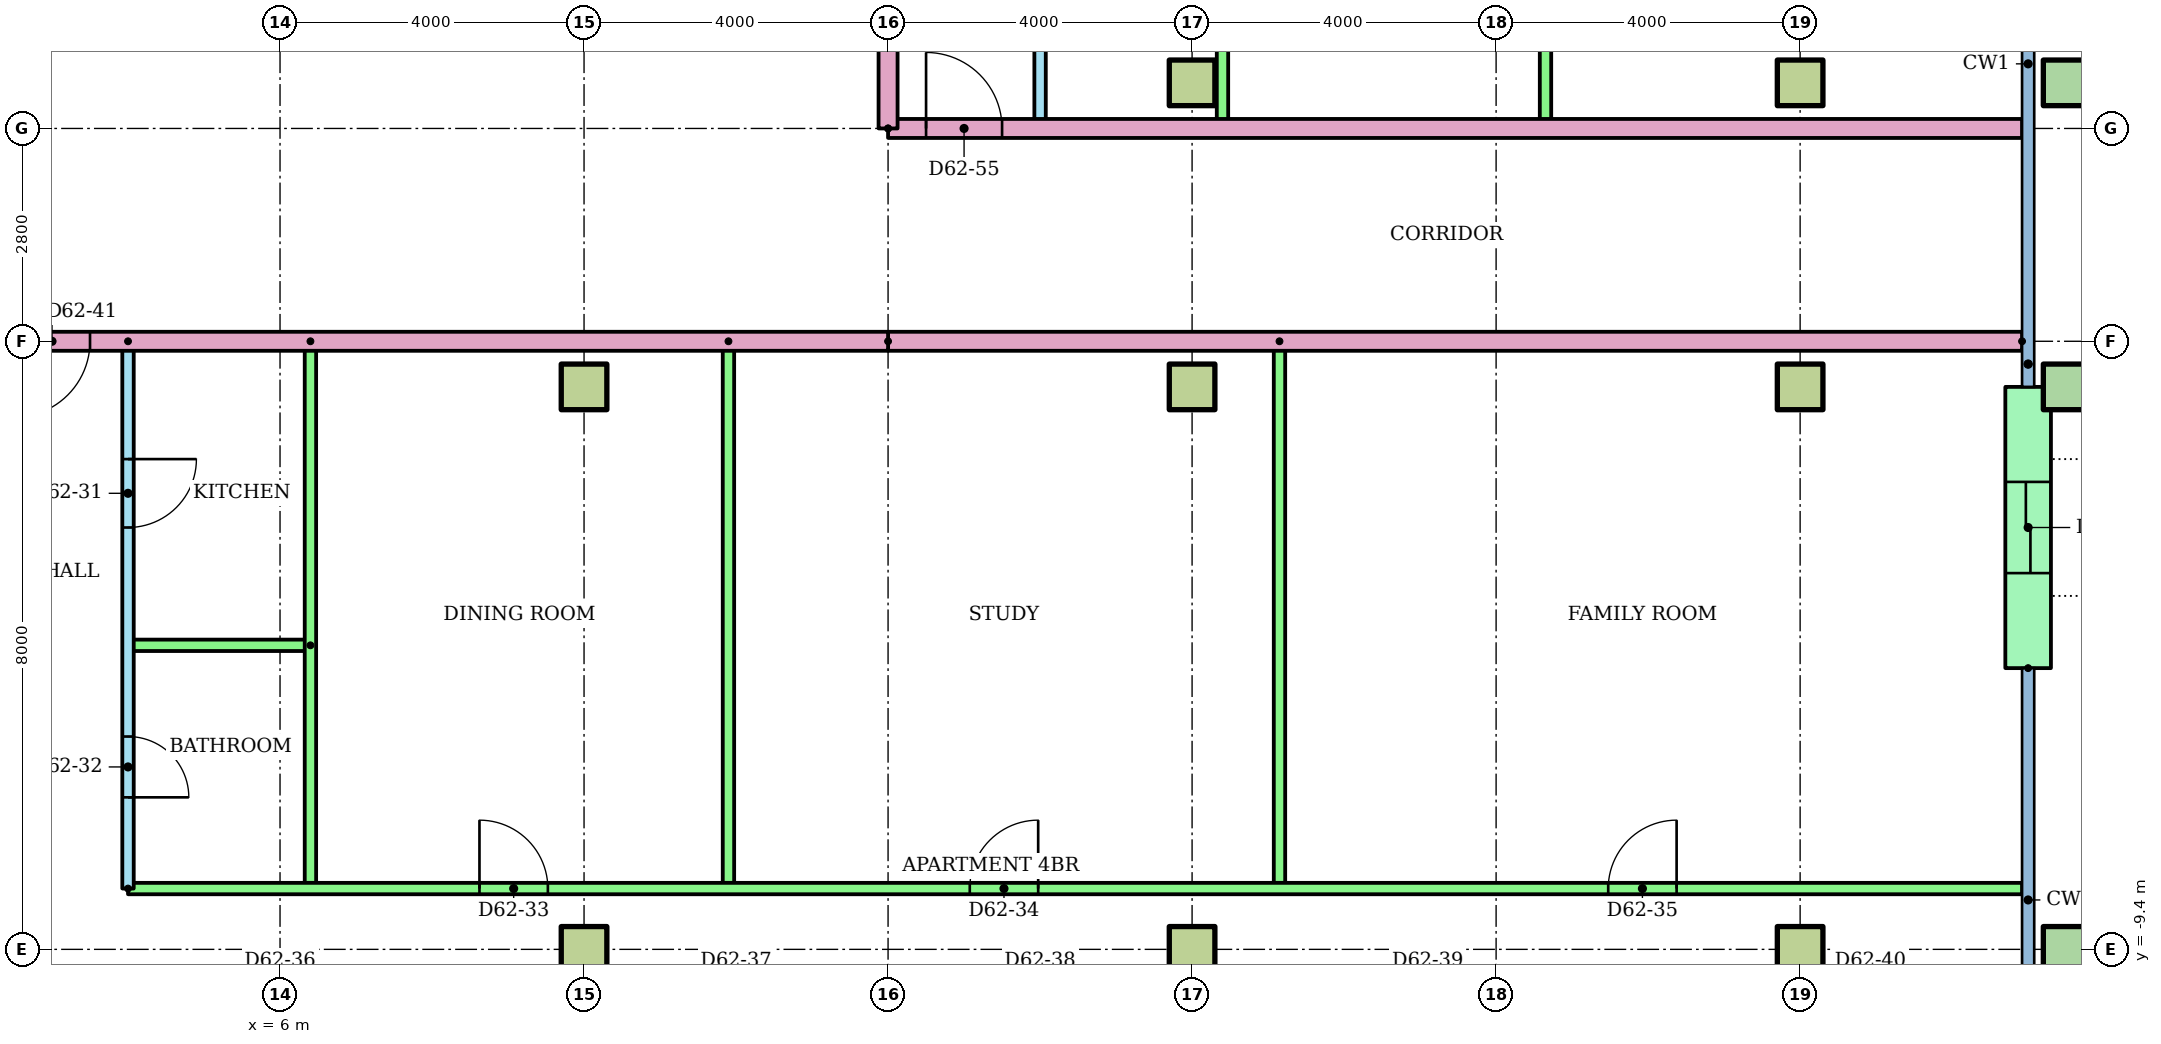
"""IFC4 building model, lengths in metres.
Left out: names, types, materials, properties, quantities, classifications, styles, units other than length and angle.
Written with IfcOpenShell. Run it as: python <this file> out.ifc"""

import sys

from ifc_helpers import new_model, si_unit, direction, frame, frame_2d, origin, origin_2d, place, context, subcontext, project, spatial, rectangle, hollow_rectangle, extrude, element, fill, save


model = new_model("IFC4")
c1 = context("Model", 3, precision=1e-05, world=origin(), true_north=direction((0.0, 1.0)))
c2 = subcontext(c1, "Body", "Model", "MODEL_VIEW")
j1 = project(units=[si_unit("LENGTHUNIT", "METRE"), si_unit("PLANEANGLEUNIT", "RADIAN")], contexts=[c1])
p1 = place(None, origin())
s1 = spatial("IfcSite", under=j1, at=p1, CompositionType="ELEMENT")
p2 = place(p1, origin())
s2 = spatial("IfcBuilding", under=s1, at=p2, CompositionType="ELEMENT")
p3 = place(p2, frame((0.0, 0.0, 236.4)))
s3 = spatial("IfcBuildingStorey", under=s2, at=p3, CompositionType="ELEMENT", Elevation=236.4)
for number, where in (
    (1, (10.0, -9.4, 0.0)),
    (2, (18.0, -9.4, 0.0)),
    (3, (26.0, -9.4, 0.0)),
):
    element("IfcColumn", number, at=place(p3, frame(where)), inside=s3, PredefinedType="COLUMN", context=c2, shape_type="SweptSolid", body=[
        extrude(rectangle(XDim=0.6, YDim=0.6, at=origin_2d()), origin(), (0.0, 0.0, 1.0), 3.2),
    ])
p4 = place(p3, frame((29.5, -9.4, 0.0)))
e4 = element("IfcColumn", 4, at=p4, inside=s3, PredefinedType="COLUMN", context=c2, shape_type="SweptSolid", body=[
    extrude(hollow_rectangle(XDim=0.6, YDim=0.6, WallThickness=0.03, at=origin_2d()), origin(), (0.0, 0.0, 1.0), 3.2),
])
for number, where in (
    (5, (10.0, -2.0, 0.0)),
    (6, (18.0, -2.0, 0.0)),
    (7, (26.0, -2.0, 0.0)),
):
    element("IfcColumn", number, at=place(p3, frame(where)), inside=s3, PredefinedType="COLUMN", context=c2, shape_type="SweptSolid", body=[
        extrude(rectangle(XDim=0.6, YDim=0.6, at=origin_2d()), origin(), (0.0, 0.0, 1.0), 3.2),
    ])
p5 = place(p3, frame((29.5, -2.0, 0.0)))
e8 = element("IfcColumn", 8, at=p5, inside=s3, PredefinedType="COLUMN", context=c2, shape_type="SweptSolid", body=[
    extrude(hollow_rectangle(XDim=0.6, YDim=0.6, WallThickness=0.03, at=origin_2d()), origin(), (0.0, 0.0, 1.0), 3.2),
])
for number, where in (
    (9, (18.0, 2.0, 0.0)),
    (10, (26.0, 2.0, 0.0)),
):
    element("IfcColumn", number, at=place(p3, frame(where)), inside=s3, PredefinedType="COLUMN", context=c2, shape_type="SweptSolid", body=[
        extrude(rectangle(XDim=0.6, YDim=0.6, at=origin_2d()), origin(), (0.0, 0.0, 1.0), 3.2),
    ])
p6 = place(p3, frame((29.5, 2.0, 0.0)))
e11 = element("IfcColumn", 11, at=p6, inside=s3, PredefinedType="COLUMN", context=c2, shape_type="SweptSolid", body=[
    extrude(hollow_rectangle(XDim=0.6, YDim=0.6, WallThickness=0.03, at=origin_2d()), origin(), (0.0, 0.0, 1.0), 3.2),
])
p7 = place(p3, frame((29.0, -5.7, 0.0), z_axis=(0.0, 0.0, 1.0), x_axis=(0.0, 1.0, 0.0)))
e12 = element("IfcWall", 12, at=p7, inside=s3, PredefinedType="STANDARD", context=c2, shape_type="SweptSolid", body=[
    extrude(rectangle(XDim=3.7, YDim=0.6, at=frame_2d((1.85, 0.0))), origin(), (0.0, 0.0, 1.0), 2.8),
])
p8 = place(p7, frame((1.25, 0.0, 0.0)))
e13 = element("IfcOpeningElement", 13, at=p8, cuts=e12, PredefinedType="OPENING", context=c2, shape_type="SweptSolid", body=[
    extrude(rectangle(XDim=1.2, YDim=2.1, at=frame_2d((0.6, 1.05))), frame((0.0, 0.31, 0.0), z_axis=(0.0, -1.0, 0.0), x_axis=(1.0, 0.0, 0.0)), (0.0, 0.0, 1.0), 0.62),
])
p9 = place(p3, frame((4.0, -1.4, 0.0), z_axis=(0.0, 0.0, 1.0), x_axis=(0.0, -1.0, 0.0)))
e14 = element("IfcWall", 14, at=p9, inside=s3, PredefinedType="PARTITIONING", context=c2, shape_type="SweptSolid", body=[
    extrude(rectangle(XDim=7.2, YDim=0.15, at=frame_2d((3.6, 0.0))), origin(), (0.0, 0.0, 1.0), 2.4),
])
p10 = place(p9, frame((1.55, 0.0, 0.0)))
e15 = element("IfcOpeningElement", 15, at=p10, cuts=e14, PredefinedType="OPENING", context=c2, shape_type="SweptSolid", body=[
    extrude(rectangle(XDim=0.9, YDim=2.1, at=frame_2d((0.45, 1.05))), frame((0.0, 0.085, 0.0), z_axis=(0.0, -1.0, 0.0), x_axis=(1.0, 0.0, 0.0)), (0.0, 0.0, 1.0), 0.17),
])
p11 = place(p9, frame((5.2, 0.0, 0.0)))
e16 = element("IfcOpeningElement", 16, at=p11, cuts=e14, PredefinedType="OPENING", context=c2, shape_type="SweptSolid", body=[
    extrude(rectangle(XDim=0.8, YDim=2.1, at=frame_2d((0.4, 1.05))), frame((0.0, 0.085, 0.0), z_axis=(0.0, -1.0, 0.0), x_axis=(1.0, 0.0, 0.0)), (0.0, 0.0, 1.0), 0.17),
])
p12 = place(p3, frame((6.4, -5.4, 0.0), z_axis=(0.0, 0.0, 1.0), x_axis=(-1.0, 0.0, 0.0)))
e17 = element("IfcWall", 17, at=p12, inside=s3, PredefinedType="PARTITIONING", context=c2, shape_type="SweptSolid", body=[
    extrude(rectangle(XDim=2.4, YDim=0.15, at=frame_2d((1.2, 0.0))), origin(), (0.0, 0.0, 1.0), 2.4),
])
for number, where, z_axis, x_axis in (
    (18, (6.4, -1.4, 0.0), (0.0, 0.0, 1.0), (0.0, -1.0, 0.0)),
    (19, (11.9, -1.4, 0.0), (0.0, 0.0, 1.0), (0.0, -1.0, 0.0)),
    (20, (19.15, -1.4, 0.0), (0.0, 0.0, 1.0), (0.0, -1.0, 0.0)),
):
    element("IfcWall", number, at=place(p3, frame(where, z_axis=z_axis, x_axis=x_axis)), inside=s3, PredefinedType="PARTITIONING", context=c2, shape_type="SweptSolid", body=[
        extrude(rectangle(XDim=7.2, YDim=0.15, at=frame_2d((3.6, 0.0))), origin(), (0.0, 0.0, 1.0), 2.4),
    ])
p13 = place(p3, frame((4.0, -8.6, 0.0)))
e21 = element("IfcWall", 21, at=p13, inside=s3, PredefinedType="PARTITIONING", context=c2, shape_type="SweptSolid", body=[
    extrude(rectangle(XDim=24.92, YDim=0.15, at=frame_2d((12.46, 0.0))), origin(), (0.0, 0.0, 1.0), 2.4),
])
p14 = place(p13, frame((4.624, 0.0, 0.0)))
e22 = element("IfcOpeningElement", 22, at=p14, cuts=e21, PredefinedType="OPENING", context=c2, shape_type="SweptSolid", body=[
    extrude(rectangle(XDim=0.9, YDim=2.1, at=frame_2d((0.45, 1.05))), frame((0.0, 0.085, 0.0), z_axis=(0.0, -1.0, 0.0), x_axis=(1.0, 0.0, 0.0)), (0.0, 0.0, 1.0), 0.17),
])
p15 = place(p13, frame((11.075, 0.0, 0.0)))
e23 = element("IfcOpeningElement", 23, at=p15, cuts=e21, PredefinedType="OPENING", context=c2, shape_type="SweptSolid", body=[
    extrude(rectangle(XDim=0.9, YDim=2.1, at=frame_2d((0.45, 1.05))), frame((0.0, 0.085, 0.0), z_axis=(0.0, -1.0, 0.0), x_axis=(1.0, 0.0, 0.0)), (0.0, 0.0, 1.0), 0.17),
])
p16 = place(p13, frame((19.475, 0.0, 0.0)))
e24 = element("IfcOpeningElement", 24, at=p16, cuts=e21, PredefinedType="OPENING", context=c2, shape_type="SweptSolid", body=[
    extrude(rectangle(XDim=0.9, YDim=2.1, at=frame_2d((0.45, 1.05))), frame((0.0, 0.085, 0.0), z_axis=(0.0, -1.0, 0.0), x_axis=(1.0, 0.0, 0.0)), (0.0, 0.0, 1.0), 0.17),
])
p17 = place(p3, frame((28.92, -1.4, 0.0), z_axis=(0.0, 0.0, 1.0), x_axis=(-1.0, 0.0, 0.0)))
e25 = element("IfcWall", 25, at=p17, inside=s3, PredefinedType="PARTITIONING", context=c2, shape_type="SweptSolid", body=[
    extrude(rectangle(XDim=14.92, YDim=0.25, at=frame_2d((7.46, 0.0))), origin(), (0.0, 0.0, 1.0), 2.4),
])
p18 = place(p3, frame((16.0, 11.0, 0.0), z_axis=(0.0, 0.0, 1.0), x_axis=(0.0, -1.0, 0.0)))
e26 = element("IfcWall", 26, at=p18, inside=s3, PredefinedType="PARTITIONING", context=c2, shape_type="SweptSolid", body=[
    extrude(rectangle(XDim=9.6, YDim=0.15, at=frame_2d((4.8, 0.0))), origin(), (0.0, 0.0, 1.0), 2.4),
])
p19 = place(p18, frame((6.525, 0.0, 0.0)))
e27 = element("IfcOpeningElement", 27, at=p19, cuts=e26, PredefinedType="OPENING", context=c2, shape_type="SweptSolid", body=[
    extrude(rectangle(XDim=0.9, YDim=2.1, at=frame_2d((0.45, 1.05))), frame((0.0, 0.085, 0.0), z_axis=(0.0, -1.0, 0.0), x_axis=(1.0, 0.0, 0.0)), (0.0, 0.0, 1.0), 0.17),
])
p20 = place(p18, frame((1.775, 0.0, 0.0)))
e28 = element("IfcOpeningElement", 28, at=p20, cuts=e26, PredefinedType="OPENING", context=c2, shape_type="SweptSolid", body=[
    extrude(rectangle(XDim=0.8, YDim=2.1, at=frame_2d((0.4, 1.05))), frame((0.0, 0.085, 0.0), z_axis=(0.0, -1.0, 0.0), x_axis=(1.0, 0.0, 0.0)), (0.0, 0.0, 1.0), 0.17),
])
for number, where, z_axis, x_axis in (
    (29, (18.4, 11.0, 0.0), (0.0, 0.0, 1.0), (0.0, -1.0, 0.0)),
    (30, (22.65, 11.0, 0.0), (0.0, 0.0, 1.0), (0.0, -1.0, 0.0)),
):
    element("IfcWall", number, at=place(p3, frame(where, z_axis=z_axis, x_axis=x_axis)), inside=s3, PredefinedType="PARTITIONING", context=c2, shape_type="SweptSolid", body=[
        extrude(rectangle(XDim=9.6, YDim=0.15, at=frame_2d((4.8, 0.0))), origin(), (0.0, 0.0, 1.0), 2.4),
    ])
p21 = place(p3, frame((14.0, 1.4, 0.0)))
e31 = element("IfcWall", 31, at=p21, inside=s3, PredefinedType="PARTITIONING", context=c2, shape_type="SweptSolid", body=[
    extrude(rectangle(XDim=14.92, YDim=0.25, at=frame_2d((7.46, 0.0))), origin(), (0.0, 0.0, 1.0), 2.4),
])
p22 = place(p21, frame((0.5, 0.0, 0.0)))
e32 = element("IfcOpeningElement", 32, at=p22, cuts=e31, PredefinedType="OPENING", context=c2, shape_type="SweptSolid", body=[
    extrude(rectangle(XDim=1.0, YDim=2.1, at=frame_2d((0.5, 1.05))), frame((0.0, 0.135, 0.0), z_axis=(0.0, -1.0, 0.0), x_axis=(1.0, 0.0, 0.0)), (0.0, 0.0, 1.0), 0.27),
])
p23 = place(p3, frame((14.0, -1.4, 0.0), z_axis=(0.0, 0.0, 1.0), x_axis=(-1.0, 0.0, 0.0)))
e33 = element("IfcWall", 33, at=p23, inside=s3, PredefinedType="PARTITIONING", context=c2, shape_type="SweptSolid", body=[
    extrude(rectangle(XDim=28.0, YDim=0.25, at=frame_2d((14.0, 0.0))), origin(), (0.0, 0.0, 1.0), 2.4),
])
p24 = place(p23, frame((12.5, 0.0, 0.0)))
e34 = element("IfcOpeningElement", 34, at=p24, cuts=e33, PredefinedType="OPENING", context=c2, shape_type="SweptSolid", body=[
    extrude(rectangle(XDim=1.0, YDim=2.1, at=frame_2d((0.5, 1.05))), frame((0.0, 0.135, 0.0), z_axis=(0.0, -1.0, 0.0), x_axis=(1.0, 0.0, 0.0)), (0.0, 0.0, 1.0), 0.27),
])
p25 = place(p23, frame((10.5, 0.0, 0.0)))
e35 = element("IfcOpeningElement", 35, at=p25, cuts=e33, PredefinedType="OPENING", context=c2, shape_type="SweptSolid", body=[
    extrude(rectangle(XDim=1.0, YDim=2.1, at=frame_2d((0.5, 1.05))), frame((0.0, 0.135, 0.0), z_axis=(0.0, -1.0, 0.0), x_axis=(1.0, 0.0, 0.0)), (0.0, 0.0, 1.0), 0.27),
])
p26 = place(p3, frame((14.0, 1.4, 0.0), z_axis=(0.0, 0.0, 1.0), x_axis=(0.0, 1.0, 0.0)))
e36 = element("IfcWall", 36, at=p26, inside=s3, PredefinedType="PARTITIONING", context=c2, shape_type="SweptSolid", body=[
    extrude(rectangle(XDim=1.6, YDim=0.25, at=frame_2d((0.8, 0.0))), origin(), (0.0, 0.0, 1.0), 2.4),
])
p27 = place(p10, origin())
e37 = element("IfcDoor", 37, at=p27, inside=s3, OperationType="SINGLE_SWING_LEFT", PredefinedType="DOOR", context=c2, shape_type="SweptSolid", body=[
    extrude(rectangle(XDim=0.9, YDim=2.1, at=frame_2d((0.45, 1.05))), frame((0.0, 0.025, 0.0), z_axis=(0.0, -1.0, 0.0), x_axis=(1.0, 0.0, 0.0)), (0.0, 0.0, 1.0), 0.05),
])
fill(e15, e37)
p28 = place(p11, origin())
e38 = element("IfcDoor", 38, at=p28, inside=s3, OperationType="SINGLE_SWING_RIGHT", PredefinedType="DOOR", context=c2, shape_type="SweptSolid", body=[
    extrude(rectangle(XDim=0.8, YDim=2.1, at=frame_2d((0.4, 1.05))), frame((0.0, 0.025, 0.0), z_axis=(0.0, -1.0, 0.0), x_axis=(1.0, 0.0, 0.0)), (0.0, 0.0, 1.0), 0.05),
])
fill(e16, e38)
p29 = place(p14, origin())
e39 = element("IfcDoor", 39, at=p29, inside=s3, OperationType="SINGLE_SWING_LEFT", PredefinedType="DOOR", context=c2, shape_type="SweptSolid", body=[
    extrude(rectangle(XDim=0.9, YDim=2.1, at=frame_2d((0.45, 1.05))), frame((0.0, 0.025, 0.0), z_axis=(0.0, -1.0, 0.0), x_axis=(1.0, 0.0, 0.0)), (0.0, 0.0, 1.0), 0.05),
])
fill(e22, e39)
p30 = place(p15, origin())
e40 = element("IfcDoor", 40, at=p30, inside=s3, OperationType="SINGLE_SWING_RIGHT", PredefinedType="DOOR", context=c2, shape_type="SweptSolid", body=[
    extrude(rectangle(XDim=0.9, YDim=2.1, at=frame_2d((0.45, 1.05))), frame((0.0, 0.025, 0.0), z_axis=(0.0, -1.0, 0.0), x_axis=(1.0, 0.0, 0.0)), (0.0, 0.0, 1.0), 0.05),
])
fill(e23, e40)
p31 = place(p16, origin())
e41 = element("IfcDoor", 41, at=p31, inside=s3, OperationType="SINGLE_SWING_RIGHT", PredefinedType="DOOR", context=c2, shape_type="SweptSolid", body=[
    extrude(rectangle(XDim=0.9, YDim=2.1, at=frame_2d((0.45, 1.05))), frame((0.0, 0.025, 0.0), z_axis=(0.0, -1.0, 0.0), x_axis=(1.0, 0.0, 0.0)), (0.0, 0.0, 1.0), 0.05),
])
fill(e24, e41)
p32 = place(p25, origin())
e42 = element("IfcDoor", 42, at=p32, inside=s3, OperationType="SINGLE_SWING_RIGHT", PredefinedType="DOOR", context=c2, shape_type="SweptSolid", body=[
    extrude(rectangle(XDim=1.0, YDim=2.1, at=frame_2d((0.5, 1.05))), frame((0.0, 0.025, 0.0), z_axis=(0.0, -1.0, 0.0), x_axis=(1.0, 0.0, 0.0)), (0.0, 0.0, 1.0), 0.05),
])
fill(e35, e42)
p33 = place(p22, origin())
e43 = element("IfcDoor", 43, at=p33, inside=s3, OperationType="SINGLE_SWING_LEFT", PredefinedType="DOOR", context=c2, shape_type="SweptSolid", body=[
    extrude(rectangle(XDim=1.0, YDim=2.1, at=frame_2d((0.5, 1.05))), frame((0.0, 0.025, 0.0), z_axis=(0.0, -1.0, 0.0), x_axis=(1.0, 0.0, 0.0)), (0.0, 0.0, 1.0), 0.05),
])
fill(e32, e43)
p34 = place(p8, origin())
e44 = element("IfcDoor", 44, at=p34, inside=s3, OperationType="SLIDING_TO_LEFT", PredefinedType="DOOR", context=c2, shape_type="SweptSolid", body=[
    extrude(rectangle(XDim=1.2, YDim=2.1, at=frame_2d((0.6, 1.05))), frame((0.0, 0.025, 0.0), z_axis=(0.0, -1.0, 0.0), x_axis=(1.0, 0.0, 0.0)), (0.0, 0.0, 1.0), 0.05),
])
fill(e13, e44)
save(model, sys.argv[1])
